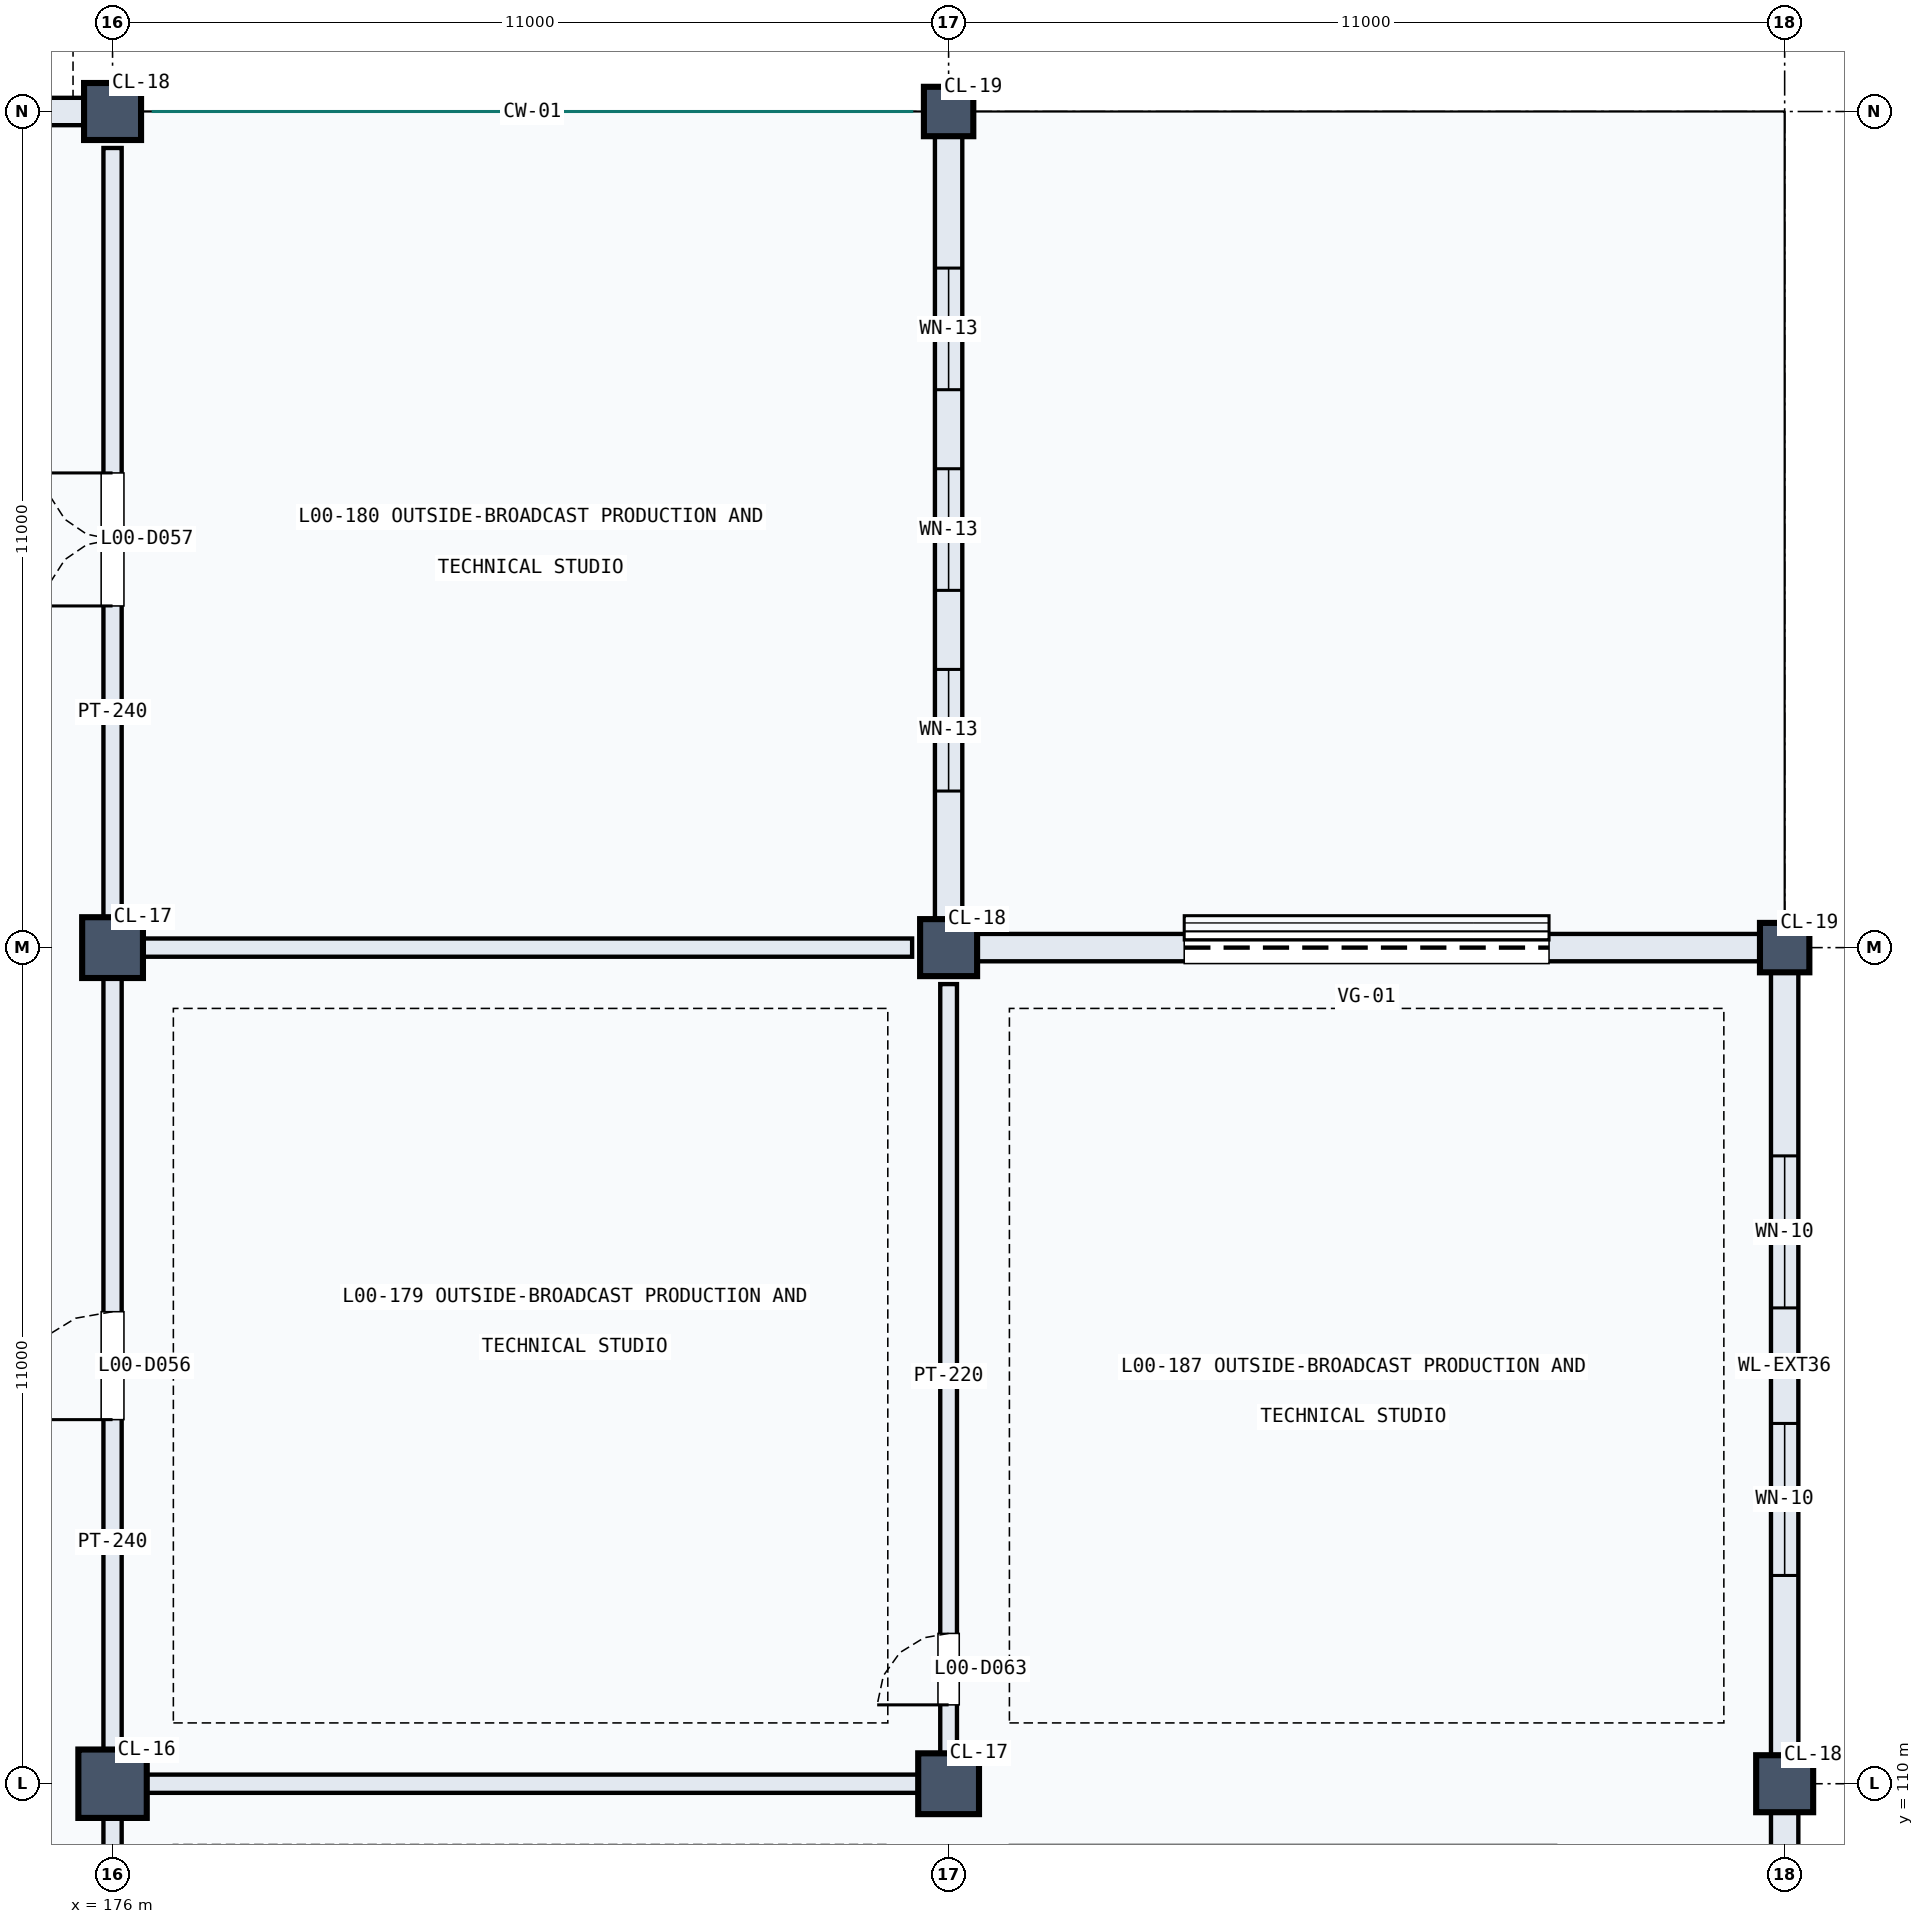
"""IFC4 building model, lengths in metres.
Left out: names, types, materials, properties, quantities, classifications, styles, units other than length and angle.
Written with IfcOpenShell. Run it as: python <this file> out.ifc"""

import sys

from ifc_helpers import new_model, si_unit, direction, frame, frame_2d, origin, origin_2d, place, context, subcontext, project, spatial, rectangle, circle, extrude, element, fill, save


model = new_model("IFC4")
c1 = context("Model", 3, precision=1e-05, world=origin(), true_north=direction((0.0, 1.0)))
c2 = subcontext(c1, "Body", "Model", "MODEL_VIEW")
j1 = project(units=[si_unit("LENGTHUNIT", "METRE"), si_unit("PLANEANGLEUNIT", "RADIAN")], contexts=[c1])
p1 = place(None, origin())
s1 = spatial("IfcSite", under=j1, at=p1, CompositionType="ELEMENT")
p2 = place(p1, origin())
s2 = spatial("IfcBuilding", under=s1, at=p2, CompositionType="ELEMENT")
p3 = place(p2, origin())
s3 = spatial("IfcBuildingStorey", under=s2, at=p3, CompositionType="ELEMENT", Elevation=0.0)
p4 = place(p3, frame((176.0, 110.0, 0.0), z_axis=(0.0, 0.0, 1.0), x_axis=(1.0, 0.0, 0.0)))
e1 = element("IfcColumn", 1, at=p4, inside=s3, PredefinedType="COLUMN", context=c2, shape_type="SweptSolid", body=[
    extrude(circle(Radius=0.45, at=origin_2d()), origin(), (0.0, 0.0, 1.0), 5.4),
])
p5 = place(p3, frame((176.0, 121.0, 0.0), z_axis=(0.0, 0.0, 1.0), x_axis=(1.0, 0.0, 0.0)))
e2 = element("IfcColumn", 2, at=p5, inside=s3, PredefinedType="COLUMN", context=c2, shape_type="SweptSolid", body=[
    extrude(circle(Radius=0.4, at=origin_2d()), origin(), (0.0, 0.0, 1.0), 5.4),
])
p6 = place(p3, frame((176.0, 132.0, 0.0), z_axis=(0.0, 0.0, 1.0), x_axis=(1.0, 0.0, 0.0)))
e3 = element("IfcColumn", 3, at=p6, inside=s3, PredefinedType="COLUMN", context=c2, shape_type="SweptSolid", body=[
    extrude(circle(Radius=0.375, at=origin_2d()), origin(), (0.0, 0.0, 1.0), 5.4),
])
p7 = place(p3, frame((187.0, 110.0, 0.0), z_axis=(0.0, 0.0, 1.0), x_axis=(1.0, 0.0, 0.0)))
e4 = element("IfcColumn", 4, at=p7, inside=s3, PredefinedType="COLUMN", context=c2, shape_type="SweptSolid", body=[
    extrude(circle(Radius=0.4, at=origin_2d()), origin(), (0.0, 0.0, 1.0), 5.4),
])
p8 = place(p3, frame((187.0, 121.0, 0.0), z_axis=(0.0, 0.0, 1.0), x_axis=(1.0, 0.0, 0.0)))
e5 = element("IfcColumn", 5, at=p8, inside=s3, PredefinedType="COLUMN", context=c2, shape_type="SweptSolid", body=[
    extrude(circle(Radius=0.375, at=origin_2d()), origin(), (0.0, 0.0, 1.0), 5.4),
])
p9 = place(p3, frame((187.0, 132.0, 0.0), z_axis=(0.0, 0.0, 1.0), x_axis=(1.0, 0.0, 0.0)))
e6 = element("IfcColumn", 6, at=p9, inside=s3, PredefinedType="COLUMN", context=c2, shape_type="SweptSolid", body=[
    extrude(circle(Radius=0.325, at=origin_2d()), origin(), (0.0, 0.0, 1.0), 5.4),
])
p10 = place(p3, frame((198.0, 110.0, 0.0), z_axis=(0.0, 0.0, 1.0), x_axis=(1.0, 0.0, 0.0)))
e7 = element("IfcColumn", 7, at=p10, inside=s3, PredefinedType="COLUMN", context=c2, shape_type="SweptSolid", body=[
    extrude(circle(Radius=0.375, at=origin_2d()), origin(), (0.0, 0.0, 1.0), 5.4),
])
p11 = place(p3, frame((198.0, 121.0, 0.0), z_axis=(0.0, 0.0, 1.0), x_axis=(1.0, 0.0, 0.0)))
e8 = element("IfcColumn", 8, at=p11, inside=s3, PredefinedType="COLUMN", context=c2, shape_type="SweptSolid", body=[
    extrude(circle(Radius=0.325, at=origin_2d()), origin(), (0.0, 0.0, 1.0), 5.4),
])
p12 = place(p3, frame((164.22, 132.0, 0.0), z_axis=(0.0, 0.0, 1.0), x_axis=(1.0, 0.0, 0.0)))
e9 = element("IfcWall", 9, at=p12, inside=s3, PredefinedType="SOLIDWALL", context=c2, shape_type="SweptSolid", body=[
    extrude(rectangle(XDim=11.56, YDim=0.36, at=frame_2d((5.78, 0.0))), origin(), (0.0, 0.0, 1.0), 5.065),
])
p13 = place(p12, frame((1.756, 0.0, 0.0)))
e10 = element("IfcOpeningElement", 10, at=p13, cuts=e9, PredefinedType="OPENING", context=c2, shape_type="SweptSolid", body=[
    extrude(rectangle(XDim=2.2, YDim=2.35, at=frame_2d((1.1, 1.175))), frame((0.0, 0.19, 0.0), z_axis=(0.0, -1.0, 0.0), x_axis=(1.0, 0.0, 0.0)), (0.0, 0.0, 1.0), 0.38),
])
p14 = place(p12, frame((7.304, 0.0, 0.0)))
e11 = element("IfcOpeningElement", 11, at=p14, cuts=e9, PredefinedType="OPENING", context=c2, shape_type="SweptSolid", body=[
    extrude(rectangle(XDim=1.8, YDim=2.3, at=frame_2d((0.9, 1.15))), frame((0.0, 0.19, 0.0), z_axis=(0.0, -1.0, 0.0), x_axis=(1.0, 0.0, 0.0)), (0.0, 0.0, 1.0), 0.38),
])
p15 = place(p12, frame((5.33, 0.0, 0.8)))
e12 = element("IfcOpeningElement", 12, at=p15, cuts=e9, PredefinedType="OPENING", context=c2, shape_type="SweptSolid", body=[
    extrude(rectangle(XDim=0.9, YDim=1.8, at=frame_2d((0.45, 0.9))), frame((0.0, 0.19, 0.0), z_axis=(0.0, -1.0, 0.0), x_axis=(1.0, 0.0, 0.0)), (0.0, 0.0, 1.0), 0.38),
])
p16 = place(p3, frame((187.0, 121.22, 0.0), z_axis=(0.0, 0.0, 1.0), x_axis=(0.0, 1.0, 0.0)))
e13 = element("IfcWall", 13, at=p16, inside=s3, PredefinedType="SOLIDWALL", context=c2, shape_type="SweptSolid", body=[
    extrude(rectangle(XDim=10.56, YDim=0.36, at=frame_2d((5.28, 0.0))), origin(), (0.0, 0.0, 1.0), 4.55),
])
p17 = place(p16, frame((1.84, 0.0, 0.9)))
e14 = element("IfcOpeningElement", 14, at=p17, cuts=e13, PredefinedType="OPENING", context=c2, shape_type="SweptSolid", body=[
    extrude(rectangle(XDim=1.6, YDim=1.65, at=frame_2d((0.8, 0.825))), frame((0.0, 0.19, 0.0), z_axis=(0.0, -1.0, 0.0), x_axis=(1.0, 0.0, 0.0)), (0.0, 0.0, 1.0), 0.38),
])
p18 = place(p16, frame((4.48, 0.0, 0.9)))
e15 = element("IfcOpeningElement", 15, at=p18, cuts=e13, PredefinedType="OPENING", context=c2, shape_type="SweptSolid", body=[
    extrude(rectangle(XDim=1.6, YDim=1.65, at=frame_2d((0.8, 0.825))), frame((0.0, 0.19, 0.0), z_axis=(0.0, -1.0, 0.0), x_axis=(1.0, 0.0, 0.0)), (0.0, 0.0, 1.0), 0.38),
])
p19 = place(p16, frame((7.12, 0.0, 0.9)))
e16 = element("IfcOpeningElement", 16, at=p19, cuts=e13, PredefinedType="OPENING", context=c2, shape_type="SweptSolid", body=[
    extrude(rectangle(XDim=1.6, YDim=1.65, at=frame_2d((0.8, 0.825))), frame((0.0, 0.19, 0.0), z_axis=(0.0, -1.0, 0.0), x_axis=(1.0, 0.0, 0.0)), (0.0, 0.0, 1.0), 0.38),
])
p20 = place(p3, frame((198.0, 99.22, 0.0), z_axis=(0.0, 0.0, 1.0), x_axis=(0.0, 1.0, 0.0)))
e17 = element("IfcWall", 17, at=p20, inside=s3, PredefinedType="SOLIDWALL", context=c2, shape_type="SweptSolid", body=[
    extrude(rectangle(XDim=10.56, YDim=0.36, at=frame_2d((5.28, 0.0))), origin(), (0.0, 0.0, 1.0), 4.1),
])
p21 = place(p20, frame((3.98, 0.0, 1.1)))
e18 = element("IfcOpeningElement", 18, at=p21, cuts=e17, PredefinedType="OPENING", context=c2, shape_type="SweptSolid", body=[
    extrude(rectangle(XDim=2.6, YDim=1.4, at=frame_2d((1.3, 0.7))), frame((0.0, 0.19, 0.0), z_axis=(0.0, -1.0, 0.0), x_axis=(1.0, 0.0, 0.0)), (0.0, 0.0, 1.0), 0.38),
])
p22 = place(p3, frame((187.22, 121.0, 0.0), z_axis=(0.0, 0.0, 1.0), x_axis=(1.0, 0.0, 0.0)))
e19 = element("IfcWall", 19, at=p22, inside=s3, PredefinedType="SOLIDWALL", context=c2, shape_type="SweptSolid", body=[
    extrude(rectangle(XDim=10.56, YDim=0.36, at=frame_2d((5.28, 0.0))), origin(), (0.0, 0.0, 1.0), 4.55),
])
p23 = place(p22, frame((2.88, 0.0, 0.0)))
e20 = element("IfcOpeningElement", 20, at=p23, cuts=e19, PredefinedType="OPENING", context=c2, shape_type="SweptSolid", body=[
    extrude(rectangle(XDim=4.8, YDim=4.35, at=frame_2d((2.4, 2.175))), frame((0.0, 0.19, 0.0), z_axis=(0.0, -1.0, 0.0), x_axis=(1.0, 0.0, 0.0)), (0.0, 0.0, 1.0), 0.38),
])
p24 = place(p3, frame((198.0, 110.22, 0.0), z_axis=(0.0, 0.0, 1.0), x_axis=(0.0, 1.0, 0.0)))
e21 = element("IfcWall", 21, at=p24, inside=s3, PredefinedType="SOLIDWALL", context=c2, shape_type="SweptSolid", body=[
    extrude(rectangle(XDim=10.56, YDim=0.36, at=frame_2d((5.28, 0.0))), origin(), (0.0, 0.0, 1.0), 4.1),
])
p25 = place(p24, frame((2.52, 0.0, 0.9)))
e22 = element("IfcOpeningElement", 22, at=p25, cuts=e21, PredefinedType="OPENING", context=c2, shape_type="SweptSolid", body=[
    extrude(rectangle(XDim=2.0, YDim=1.65, at=frame_2d((1.0, 0.825))), frame((0.0, 0.19, 0.0), z_axis=(0.0, -1.0, 0.0), x_axis=(1.0, 0.0, 0.0)), (0.0, 0.0, 1.0), 0.38),
])
p26 = place(p24, frame((6.04, 0.0, 0.9)))
e23 = element("IfcOpeningElement", 23, at=p26, cuts=e21, PredefinedType="OPENING", context=c2, shape_type="SweptSolid", body=[
    extrude(rectangle(XDim=2.0, YDim=1.65, at=frame_2d((1.0, 0.825))), frame((0.0, 0.19, 0.0), z_axis=(0.0, -1.0, 0.0), x_axis=(1.0, 0.0, 0.0)), (0.0, 0.0, 1.0), 0.38),
])
p27 = place(p3, frame((176.0, 99.22, 0.0), z_axis=(0.0, 0.0, 1.0), x_axis=(0.0, 1.0, 0.0)))
e24 = element("IfcWall", 24, at=p27, inside=s3, PredefinedType="PARTITIONING", context=c2, shape_type="SweptSolid", body=[
    extrude(rectangle(XDim=10.56, YDim=0.24, at=frame_2d((5.28, 0.0))), origin(), (0.0, 0.0, 1.0), 4.15),
])
p28 = place(p27, frame((4.44, 0.0, 0.0)))
e25 = element("IfcOpeningElement", 25, at=p28, cuts=e24, PredefinedType="OPENING", context=c2, shape_type="SweptSolid", body=[
    extrude(rectangle(XDim=1.68, YDim=2.2, at=frame_2d((0.84, 1.1))), frame((0.0, 0.13, 0.0), z_axis=(0.0, -1.0, 0.0), x_axis=(1.0, 0.0, 0.0)), (0.0, 0.0, 1.0), 0.26),
])
p29 = place(p3, frame((176.0, 110.22, 0.0), z_axis=(0.0, 0.0, 1.0), x_axis=(0.0, 1.0, 0.0)))
e26 = element("IfcWall", 26, at=p29, inside=s3, PredefinedType="PARTITIONING", context=c2, shape_type="SweptSolid", body=[
    extrude(rectangle(XDim=10.56, YDim=0.24, at=frame_2d((5.28, 0.0))), origin(), (0.0, 0.0, 1.0), 4.15),
])
p30 = place(p29, frame((4.57, 0.0, 0.0)))
e27 = element("IfcOpeningElement", 27, at=p30, cuts=e26, PredefinedType="OPENING", context=c2, shape_type="SweptSolid", body=[
    extrude(rectangle(XDim=1.42, YDim=2.25, at=frame_2d((0.71, 1.125))), frame((0.0, 0.13, 0.0), z_axis=(0.0, -1.0, 0.0), x_axis=(1.0, 0.0, 0.0)), (0.0, 0.0, 1.0), 0.26),
])
p31 = place(p3, frame((176.0, 121.22, 0.0), z_axis=(0.0, 0.0, 1.0), x_axis=(0.0, 1.0, 0.0)))
e28 = element("IfcWall", 28, at=p31, inside=s3, PredefinedType="PARTITIONING", context=c2, shape_type="SweptSolid", body=[
    extrude(rectangle(XDim=10.3, YDim=0.24, at=frame_2d((5.15, 0.0))), origin(), (0.0, 0.0, 1.0), 4.438),
])
p32 = place(p31, frame((4.275, 0.0, 0.0)))
e29 = element("IfcOpeningElement", 29, at=p32, cuts=e28, PredefinedType="OPENING", context=c2, shape_type="SweptSolid", body=[
    extrude(rectangle(XDim=1.75, YDim=2.25, at=frame_2d((0.875, 1.125))), frame((0.0, 0.13, 0.0), z_axis=(0.0, -1.0, 0.0), x_axis=(1.0, 0.0, 0.0)), (0.0, 0.0, 1.0), 0.26),
])
p33 = place(p3, frame((176.22, 110.0, 0.0), z_axis=(0.0, 0.0, 1.0), x_axis=(1.0, 0.0, 0.0)))
e30 = element("IfcWall", 30, at=p33, inside=s3, PredefinedType="PARTITIONING", context=c2, shape_type="SweptSolid", body=[
    extrude(rectangle(XDim=10.56, YDim=0.24, at=frame_2d((5.28, 0.0))), origin(), (0.0, 0.0, 1.0), 4.1),
])
p34 = place(p3, frame((176.22, 121.0, 0.0), z_axis=(0.0, 0.0, 1.0), x_axis=(1.0, 0.0, 0.0)))
e31 = element("IfcWall", 31, at=p34, inside=s3, PredefinedType="PARTITIONING", context=c2, shape_type="SweptSolid", body=[
    extrude(rectangle(XDim=10.3, YDim=0.24, at=frame_2d((5.15, 0.0))), origin(), (0.0, 0.0, 1.0), 4.438),
])
p35 = place(p3, frame((187.0, 110.22, 0.0), z_axis=(0.0, 0.0, 1.0), x_axis=(0.0, 1.0, 0.0)))
e32 = element("IfcWall", 32, at=p35, inside=s3, PredefinedType="PARTITIONING", context=c2, shape_type="SweptSolid", body=[
    extrude(rectangle(XDim=10.3, YDim=0.22, at=frame_2d((5.15, 0.0))), origin(), (0.0, 0.0, 1.0), 4.1),
])
p36 = place(p35, frame((0.817, 0.0, 0.0)))
e33 = element("IfcOpeningElement", 33, at=p36, cuts=e32, PredefinedType="OPENING", context=c2, shape_type="SweptSolid", body=[
    extrude(rectangle(XDim=0.94, YDim=2.15, at=frame_2d((0.47, 1.075))), frame((0.0, 0.12, 0.0), z_axis=(0.0, -1.0, 0.0), x_axis=(1.0, 0.0, 0.0)), (0.0, 0.0, 1.0), 0.24),
])
p37 = place(p23, origin())
e34 = element("IfcDoor", 34, at=p37, inside=s3, OperationType="ROLLINGUP", PredefinedType="DOOR", context=c2, shape_type="SweptSolid", body=[
    extrude(rectangle(XDim=4.8, YDim=4.35, at=frame_2d((2.4, 2.175))), frame((0.0, 0.025, 0.0), z_axis=(0.0, -1.0, 0.0), x_axis=(1.0, 0.0, 0.0)), (0.0, 0.0, 1.0), 0.05),
])
fill(e20, e34)
p38 = place(p17, origin())
e35 = element("IfcWindow", 35, at=p38, inside=s3, PartitioningType="SINGLE_PANEL", PredefinedType="WINDOW", context=c2, shape_type="SweptSolid", body=[
    extrude(rectangle(XDim=1.6, YDim=1.65, at=frame_2d((0.8, 0.825))), frame((0.0, 0.03, 0.0), z_axis=(0.0, -1.0, 0.0), x_axis=(1.0, 0.0, 0.0)), (0.0, 0.0, 1.0), 0.06),
])
fill(e14, e35)
p39 = place(p18, origin())
e36 = element("IfcWindow", 36, at=p39, inside=s3, PartitioningType="SINGLE_PANEL", PredefinedType="WINDOW", context=c2, shape_type="SweptSolid", body=[
    extrude(rectangle(XDim=1.6, YDim=1.65, at=frame_2d((0.8, 0.825))), frame((0.0, 0.03, 0.0), z_axis=(0.0, -1.0, 0.0), x_axis=(1.0, 0.0, 0.0)), (0.0, 0.0, 1.0), 0.06),
])
fill(e15, e36)
p40 = place(p19, origin())
e37 = element("IfcWindow", 37, at=p40, inside=s3, PartitioningType="SINGLE_PANEL", PredefinedType="WINDOW", context=c2, shape_type="SweptSolid", body=[
    extrude(rectangle(XDim=1.6, YDim=1.65, at=frame_2d((0.8, 0.825))), frame((0.0, 0.03, 0.0), z_axis=(0.0, -1.0, 0.0), x_axis=(1.0, 0.0, 0.0)), (0.0, 0.0, 1.0), 0.06),
])
fill(e16, e37)
p41 = place(p25, origin())
e38 = element("IfcWindow", 38, at=p41, inside=s3, PartitioningType="SINGLE_PANEL", PredefinedType="WINDOW", context=c2, shape_type="SweptSolid", body=[
    extrude(rectangle(XDim=2.0, YDim=1.65, at=frame_2d((1.0, 0.825))), frame((0.0, 0.03, 0.0), z_axis=(0.0, -1.0, 0.0), x_axis=(1.0, 0.0, 0.0)), (0.0, 0.0, 1.0), 0.06),
])
fill(e22, e38)
p42 = place(p26, origin())
e39 = element("IfcWindow", 39, at=p42, inside=s3, PartitioningType="SINGLE_PANEL", PredefinedType="WINDOW", context=c2, shape_type="SweptSolid", body=[
    extrude(rectangle(XDim=2.0, YDim=1.65, at=frame_2d((1.0, 0.825))), frame((0.0, 0.03, 0.0), z_axis=(0.0, -1.0, 0.0), x_axis=(1.0, 0.0, 0.0)), (0.0, 0.0, 1.0), 0.06),
])
fill(e23, e39)
p43 = place(p30, origin())
e40 = element("IfcDoor", 40, at=p43, inside=s3, OperationType="SINGLE_SWING_LEFT", PredefinedType="DOOR", context=c2, shape_type="SweptSolid", body=[
    extrude(rectangle(XDim=1.42, YDim=2.25, at=frame_2d((0.71, 1.125))), frame((0.0, 0.025, 0.0), z_axis=(0.0, -1.0, 0.0), x_axis=(1.0, 0.0, 0.0)), (0.0, 0.0, 1.0), 0.05),
])
fill(e27, e40)
p44 = place(p32, origin())
e41 = element("IfcDoor", 41, at=p44, inside=s3, OperationType="DOUBLE_DOOR_SINGLE_SWING", PredefinedType="DOOR", context=c2, shape_type="SweptSolid", body=[
    extrude(rectangle(XDim=1.75, YDim=2.25, at=frame_2d((0.875, 1.125))), frame((0.0, 0.025, 0.0), z_axis=(0.0, -1.0, 0.0), x_axis=(1.0, 0.0, 0.0)), (0.0, 0.0, 1.0), 0.05),
])
fill(e29, e41)
p45 = place(p36, origin())
e42 = element("IfcDoor", 42, at=p45, inside=s3, OperationType="SINGLE_SWING_LEFT", PredefinedType="DOOR", context=c2, shape_type="SweptSolid", body=[
    extrude(rectangle(XDim=0.94, YDim=2.15, at=frame_2d((0.47, 1.075))), frame((0.0, 0.025, 0.0), z_axis=(0.0, -1.0, 0.0), x_axis=(1.0, 0.0, 0.0)), (0.0, 0.0, 1.0), 0.05),
])
fill(e33, e42)
save(model, sys.argv[1])
